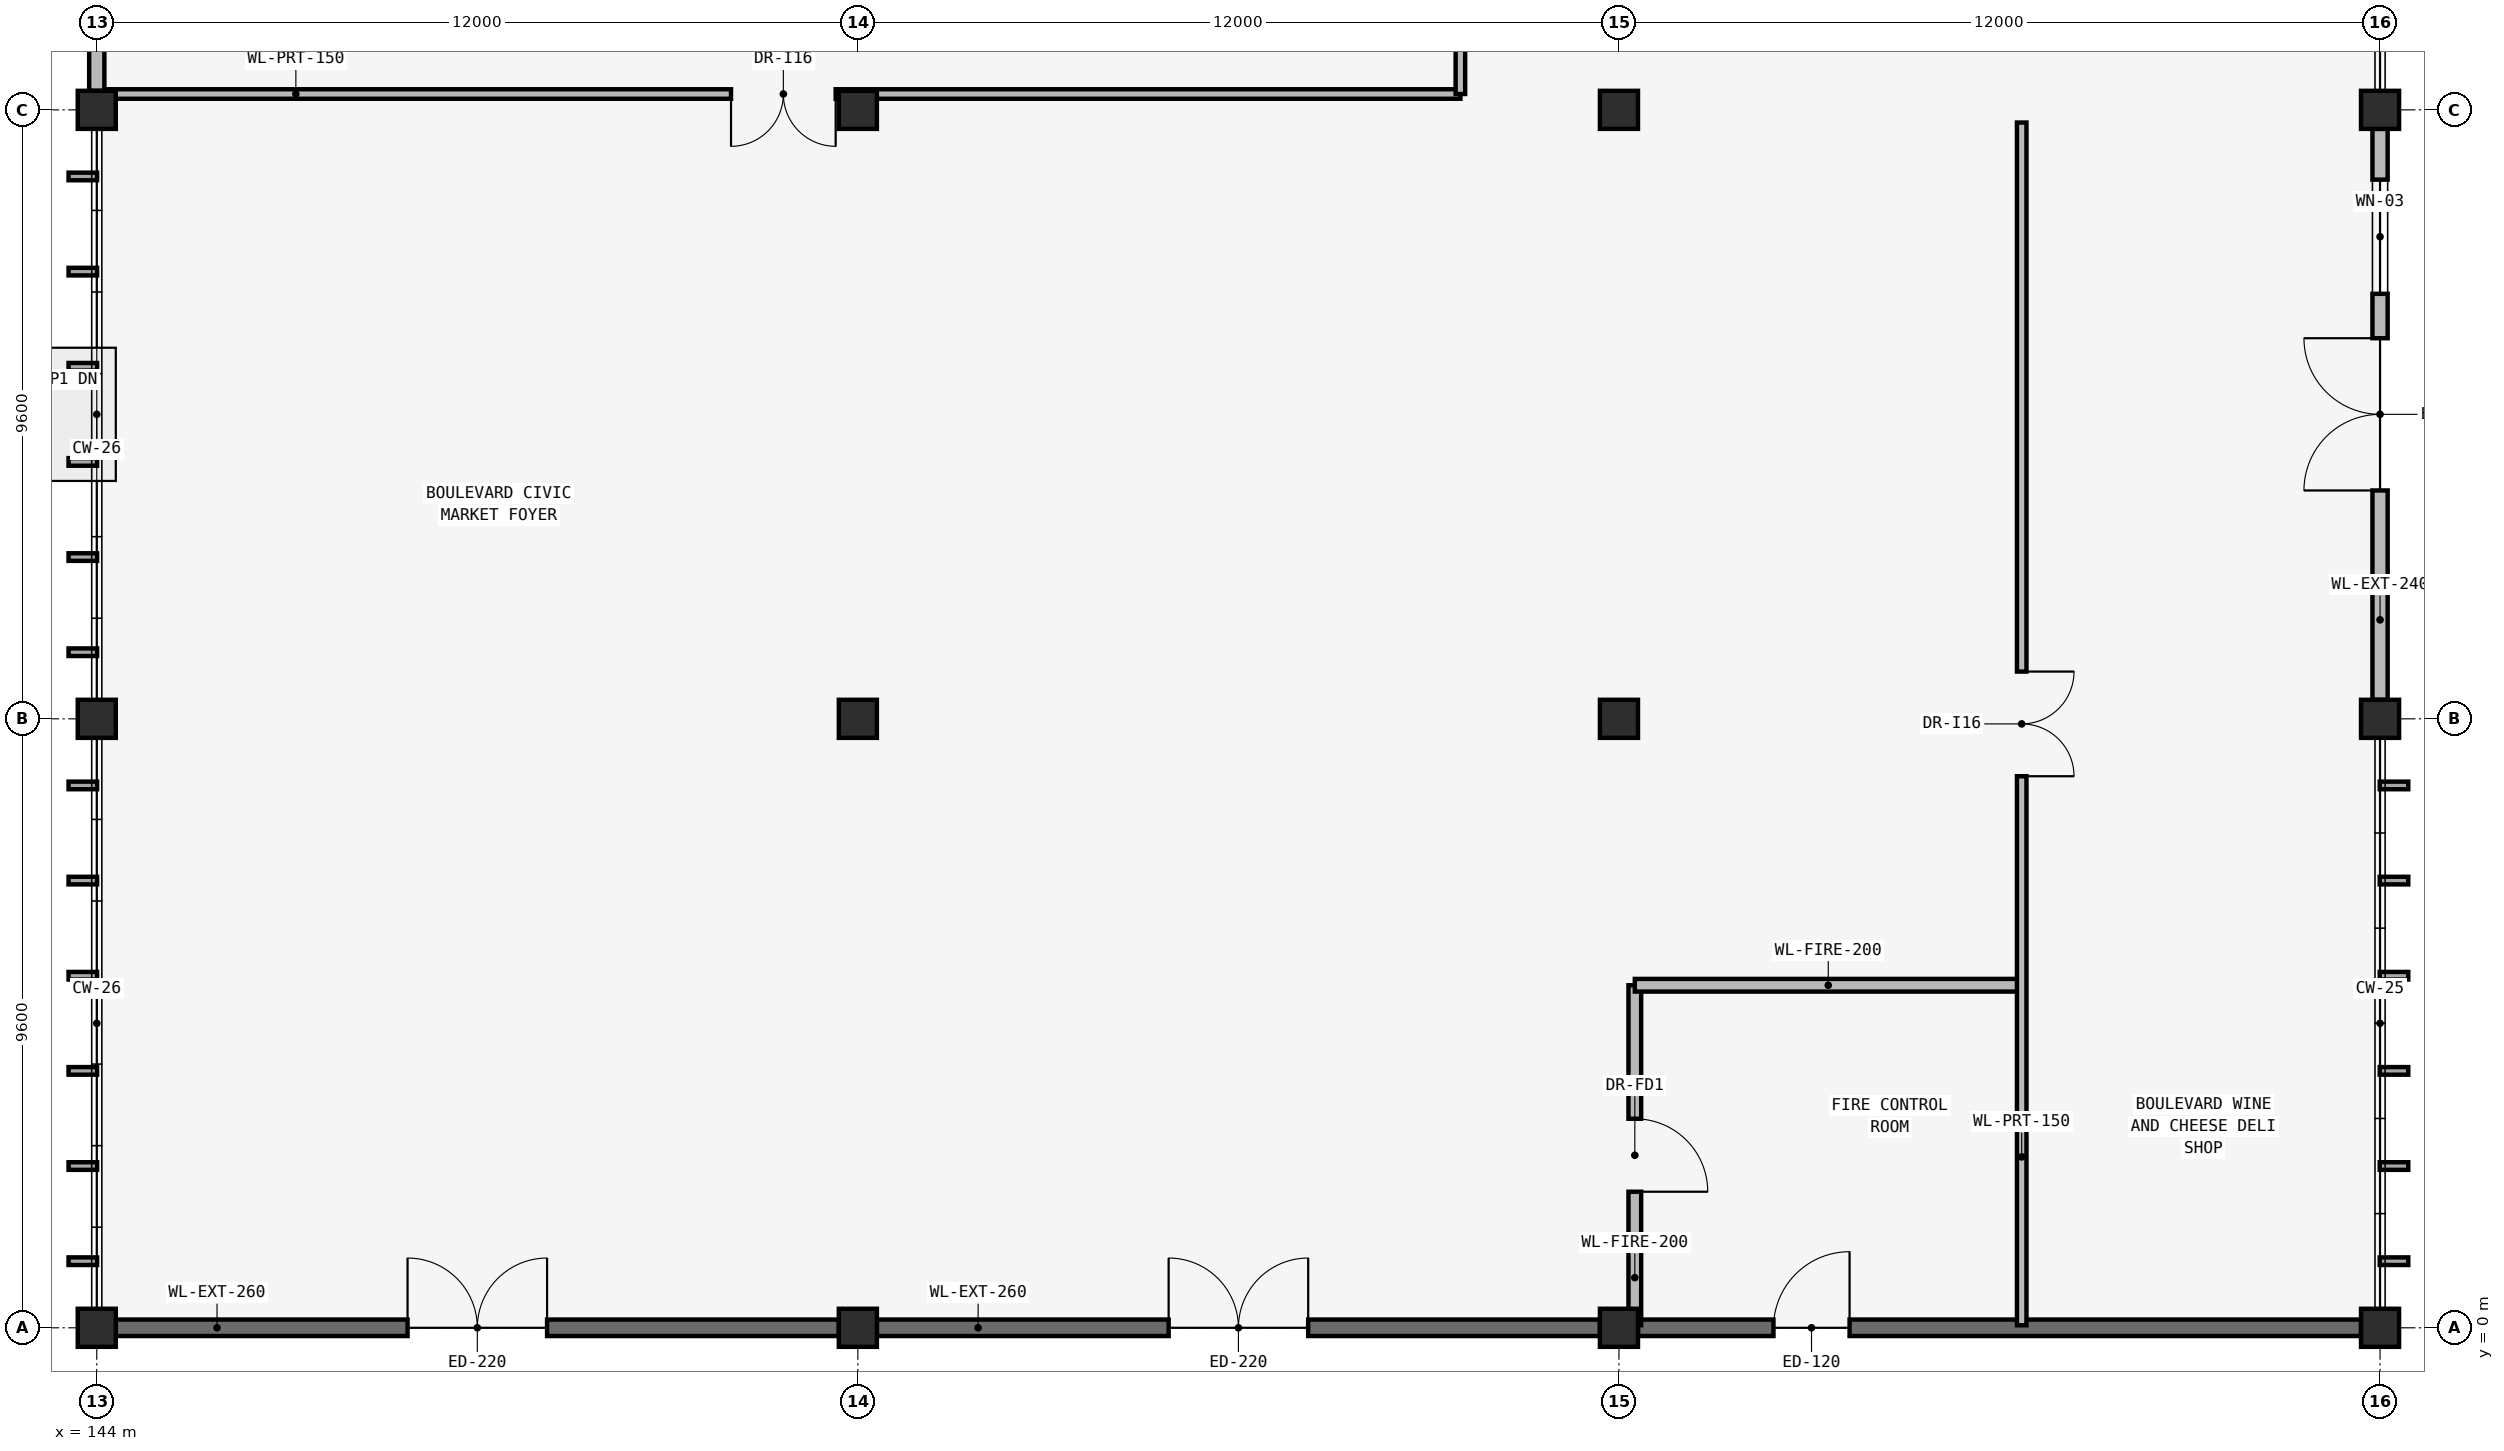
"""IFC4 building model, lengths in metres.
Left out: names, types, materials, properties, quantities, classifications, styles, units other than length and angle.
Written with IfcOpenShell. Run it as: python <this file> out.ifc"""

import sys

from ifc_helpers import new_model, si_unit, direction, frame, frame_2d, origin, origin_2d, place, context, subcontext, project, spatial, rectangle, extrude, element, fill, save


model = new_model("IFC4")
c1 = context("Model", 3, precision=1e-05, world=origin(), true_north=direction((0.0, 1.0)))
c2 = subcontext(c1, "Body", "Model", "MODEL_VIEW")
j1 = project(units=[si_unit("LENGTHUNIT", "METRE"), si_unit("PLANEANGLEUNIT", "RADIAN")], contexts=[c1])
p1 = place(None, origin())
s1 = spatial("IfcSite", under=j1, at=p1, CompositionType="ELEMENT")
p2 = place(p1, origin())
s2 = spatial("IfcBuilding", under=s1, at=p2, CompositionType="ELEMENT")
p3 = place(p2, origin())
s3 = spatial("IfcBuildingStorey", under=s2, at=p3, CompositionType="ELEMENT", Elevation=0.0)
for number, where, z_axis, x_axis in (
    (1, (144.0, 0.0, 0.0), (0.0, 0.0, 1.0), (1.0, 0.0, 0.0)),
    (2, (144.0, 9.6, 0.0), (0.0, 0.0, 1.0), (1.0, 0.0, 0.0)),
    (3, (144.0, 19.2, 0.0), (0.0, 0.0, 1.0), (1.0, 0.0, 0.0)),
    (4, (156.0, 0.0, 0.0), (0.0, 0.0, 1.0), (1.0, 0.0, 0.0)),
    (5, (156.0, 9.6, 0.0), (0.0, 0.0, 1.0), (1.0, 0.0, 0.0)),
    (6, (156.0, 19.2, 0.0), (0.0, 0.0, 1.0), (1.0, 0.0, 0.0)),
    (7, (168.0, 0.0, 0.0), (0.0, 0.0, 1.0), (1.0, 0.0, 0.0)),
    (8, (168.0, 9.6, 0.0), (0.0, 0.0, 1.0), (1.0, 0.0, 0.0)),
    (9, (168.0, 19.2, 0.0), (0.0, 0.0, 1.0), (1.0, 0.0, 0.0)),
    (10, (180.0, 0.0, 0.0), (0.0, 0.0, 1.0), (1.0, 0.0, 0.0)),
    (11, (180.0, 9.6, 0.0), (0.0, 0.0, 1.0), (1.0, 0.0, 0.0)),
    (12, (180.0, 19.2, 0.0), (0.0, 0.0, 1.0), (1.0, 0.0, 0.0)),
):
    element("IfcColumn", number, at=place(p3, frame(where, z_axis=z_axis, x_axis=x_axis)), inside=s3, PredefinedType="COLUMN", context=c2, shape_type="SweptSolid", body=[
        extrude(rectangle(XDim=0.6, YDim=0.6, at=origin_2d()), origin(), (0.0, 0.0, 1.0), 5.4),
    ])
p4 = place(p3, frame((144.3, 0.0, 0.0), z_axis=(0.0, 0.0, 1.0), x_axis=(1.0, 0.0, 0.0)))
e13 = element("IfcWall", 13, at=p4, inside=s3, PredefinedType="SOLIDWALL", context=c2, shape_type="SweptSolid", body=[
    extrude(rectangle(XDim=11.4, YDim=0.26, at=frame_2d((5.7, 0.0))), origin(), (0.0, 0.0, 1.0), 5.1),
])
p5 = place(p4, frame((4.6, 0.0, 0.0)))
e14 = element("IfcOpeningElement", 14, at=p5, cuts=e13, PredefinedType="OPENING", context=c2, shape_type="SweptSolid", body=[
    extrude(rectangle(XDim=2.2, YDim=2.4, at=frame_2d((1.1, 1.2))), frame((0.0, 0.145, 0.0), z_axis=(0.0, -1.0, 0.0), x_axis=(1.0, 0.0, 0.0)), (0.0, 0.0, 1.0), 0.29),
])
p6 = place(p3, frame((156.3, 0.0, 0.0), z_axis=(0.0, 0.0, 1.0), x_axis=(1.0, 0.0, 0.0)))
e15 = element("IfcWall", 15, at=p6, inside=s3, PredefinedType="SOLIDWALL", context=c2, shape_type="SweptSolid", body=[
    extrude(rectangle(XDim=11.4, YDim=0.26, at=frame_2d((5.7, 0.0))), origin(), (0.0, 0.0, 1.0), 5.1),
])
p7 = place(p6, frame((4.6, 0.0, 0.0)))
e16 = element("IfcOpeningElement", 16, at=p7, cuts=e15, PredefinedType="OPENING", context=c2, shape_type="SweptSolid", body=[
    extrude(rectangle(XDim=2.2, YDim=2.4, at=frame_2d((1.1, 1.2))), frame((0.0, 0.145, 0.0), z_axis=(0.0, -1.0, 0.0), x_axis=(1.0, 0.0, 0.0)), (0.0, 0.0, 1.0), 0.29),
])
p8 = place(p3, frame((168.3, 0.0, 0.0), z_axis=(0.0, 0.0, 1.0), x_axis=(1.0, 0.0, 0.0)))
e17 = element("IfcWall", 17, at=p8, inside=s3, PredefinedType="SOLIDWALL", context=c2, shape_type="SweptSolid", body=[
    extrude(rectangle(XDim=11.4, YDim=0.26, at=frame_2d((5.7, 0.0))), origin(), (0.0, 0.0, 1.0), 5.1),
])
p9 = place(p8, frame((2.136, 0.0, 0.0)))
e18 = element("IfcOpeningElement", 18, at=p9, cuts=e17, PredefinedType="OPENING", context=c2, shape_type="SweptSolid", body=[
    extrude(rectangle(XDim=1.2, YDim=2.2, at=frame_2d((0.6, 1.1))), frame((0.0, 0.145, 0.0), z_axis=(0.0, -1.0, 0.0), x_axis=(1.0, 0.0, 0.0)), (0.0, 0.0, 1.0), 0.29),
])
p10 = place(p3, frame((180.0, 9.9, 0.0), z_axis=(0.0, 0.0, 1.0), x_axis=(0.0, 1.0, 0.0)))
e19 = element("IfcWall", 19, at=p10, inside=s3, PredefinedType="SOLIDWALL", context=c2, shape_type="SweptSolid", body=[
    extrude(rectangle(XDim=9.0, YDim=0.24, at=frame_2d((4.5, 0.0))), origin(), (0.0, 0.0, 1.0), 4.321),
])
p11 = place(p10, frame((3.3, 0.0, 0.0)))
e20 = element("IfcOpeningElement", 20, at=p11, cuts=e19, PredefinedType="OPENING", context=c2, shape_type="SweptSolid", body=[
    extrude(rectangle(XDim=2.4, YDim=2.4, at=frame_2d((1.2, 1.2))), frame((0.0, 0.135, 0.0), z_axis=(0.0, -1.0, 0.0), x_axis=(1.0, 0.0, 0.0)), (0.0, 0.0, 1.0), 0.27),
])
p12 = place(p10, frame((6.4, 0.0, 0.9)))
e21 = element("IfcOpeningElement", 21, at=p12, cuts=e19, PredefinedType="OPENING", context=c2, shape_type="SweptSolid", body=[
    extrude(rectangle(XDim=1.8, YDim=1.8, at=frame_2d((0.9, 0.9))), frame((0.0, 0.135, 0.0), z_axis=(0.0, -1.0, 0.0), x_axis=(1.0, 0.0, 0.0)), (0.0, 0.0, 1.0), 0.27),
])
p13 = place(p3, frame((144.0, 19.5, 0.0), z_axis=(0.0, 0.0, 1.0), x_axis=(0.0, 1.0, 0.0)))
e22 = element("IfcWall", 22, at=p13, inside=s3, PredefinedType="SOLIDWALL", context=c2, shape_type="SweptSolid", body=[
    extrude(rectangle(XDim=9.0, YDim=0.24, at=frame_2d((4.5, 0.0))), origin(), (0.0, 0.0, 1.0), 4.321),
])
p14 = place(p13, frame((3.4, 0.0, 0.0)))
e23 = element("IfcOpeningElement", 23, at=p14, cuts=e22, PredefinedType="OPENING", context=c2, shape_type="SweptSolid", body=[
    extrude(rectangle(XDim=2.2, YDim=2.4, at=frame_2d((1.1, 1.2))), frame((0.0, 0.135, 0.0), z_axis=(0.0, -1.0, 0.0), x_axis=(1.0, 0.0, 0.0)), (0.0, 0.0, 1.0), 0.27),
])
p15 = place(p3, frame((168.25, 0.04, 0.0), z_axis=(0.0, 0.0, 1.0), x_axis=(0.0, 1.0, 0.0)))
e24 = element("IfcWall", 24, at=p15, inside=s3, PredefinedType="SOLIDWALL", context=c2, shape_type="SweptSolid", body=[
    extrude(rectangle(XDim=5.36, YDim=0.2, at=frame_2d((2.68, 0.0))), origin(), (0.0, 0.0, 1.0), 5.08),
])
p16 = place(p15, frame((2.105, 0.0, 0.0)))
e25 = element("IfcOpeningElement", 25, at=p16, cuts=e24, PredefinedType="OPENING", context=c2, shape_type="SweptSolid", body=[
    extrude(rectangle(XDim=1.15, YDim=2.15, at=frame_2d((0.575, 1.075))), frame((0.0, 0.115, 0.0), z_axis=(0.0, -1.0, 0.0), x_axis=(1.0, 0.0, 0.0)), (0.0, 0.0, 1.0), 0.23),
])
p17 = place(p3, frame((168.25, 5.4, 0.0), z_axis=(0.0, 0.0, 1.0), x_axis=(1.0, 0.0, 0.0)))
e26 = element("IfcWall", 26, at=p17, inside=s3, PredefinedType="SOLIDWALL", context=c2, shape_type="SweptSolid", body=[
    extrude(rectangle(XDim=6.1, YDim=0.2, at=frame_2d((3.05, 0.0))), origin(), (0.0, 0.0, 1.0), 5.08),
])
p18 = place(p3, frame((174.35, 0.04, 0.0), z_axis=(0.0, 0.0, 1.0), x_axis=(0.0, 1.0, 0.0)))
e27 = element("IfcWall", 27, at=p18, inside=s3, PredefinedType="PARTITIONING", context=c2, shape_type="SweptSolid", body=[
    extrude(rectangle(XDim=18.96, YDim=0.15, at=frame_2d((9.48, 0.0))), origin(), (0.0, 0.0, 1.0), 5.08),
])
p19 = place(p18, frame((8.655, 0.0, 0.0)))
e28 = element("IfcOpeningElement", 28, at=p19, cuts=e27, PredefinedType="OPENING", context=c2, shape_type="SweptSolid", body=[
    extrude(rectangle(XDim=1.65, YDim=2.2, at=frame_2d((0.825, 1.1))), frame((0.0, 0.09, 0.0), z_axis=(0.0, -1.0, 0.0), x_axis=(1.0, 0.0, 0.0)), (0.0, 0.0, 1.0), 0.18),
])
p20 = place(p3, frame((144.15, 19.45, 0.0), z_axis=(0.0, 0.0, 1.0), x_axis=(1.0, 0.0, 0.0)))
e29 = element("IfcWall", 29, at=p20, inside=s3, PredefinedType="PARTITIONING", context=c2, shape_type="SweptSolid", body=[
    extrude(rectangle(XDim=21.35, YDim=0.15, at=frame_2d((10.675, 0.0))), origin(), (0.0, 0.0, 1.0), 5.08),
])
p21 = place(p20, frame((9.85, 0.0, 0.0)))
e30 = element("IfcOpeningElement", 30, at=p21, cuts=e29, PredefinedType="OPENING", context=c2, shape_type="SweptSolid", body=[
    extrude(rectangle(XDim=1.65, YDim=2.2, at=frame_2d((0.825, 1.1))), frame((0.0, 0.09, 0.0), z_axis=(0.0, -1.0, 0.0), x_axis=(1.0, 0.0, 0.0)), (0.0, 0.0, 1.0), 0.18),
])
p22 = place(p3, frame((165.5, 19.45, 0.0), z_axis=(0.0, 0.0, 1.0), x_axis=(0.0, 1.0, 0.0)))
e31 = element("IfcWall", 31, at=p22, inside=s3, PredefinedType="PARTITIONING", context=c2, shape_type="SweptSolid", body=[
    extrude(rectangle(XDim=18.8, YDim=0.15, at=frame_2d((9.4, 0.0))), origin(), (0.0, 0.0, 1.0), 5.08),
])
p23 = place(p22, frame((8.475, 0.0, 0.0)))
e32 = element("IfcOpeningElement", 32, at=p23, cuts=e31, PredefinedType="OPENING", context=c2, shape_type="SweptSolid", body=[
    extrude(rectangle(XDim=1.85, YDim=2.2, at=frame_2d((0.925, 1.1))), frame((0.0, 0.09, 0.0), z_axis=(0.0, -1.0, 0.0), x_axis=(1.0, 0.0, 0.0)), (0.0, 0.0, 1.0), 0.18),
])
p24 = place(p5, frame((2.2, 0.0, 0.0), z_axis=(0.0, 0.0, 1.0), x_axis=(-1.0, 0.0, 0.0)))
e33 = element("IfcDoor", 33, at=p24, inside=s3, OperationType="DOUBLE_DOOR_SINGLE_SWING", PredefinedType="DOOR", context=c2, shape_type="SweptSolid", body=[
    extrude(rectangle(XDim=2.2, YDim=2.4, at=frame_2d((1.1, 1.2))), frame((0.0, 0.025, 0.0), z_axis=(0.0, -1.0, 0.0), x_axis=(1.0, 0.0, 0.0)), (0.0, 0.0, 1.0), 0.05),
])
fill(e14, e33)
p25 = place(p7, frame((2.2, 0.0, 0.0), z_axis=(0.0, 0.0, 1.0), x_axis=(-1.0, 0.0, 0.0)))
e34 = element("IfcDoor", 34, at=p25, inside=s3, OperationType="DOUBLE_DOOR_SINGLE_SWING", PredefinedType="DOOR", context=c2, shape_type="SweptSolid", body=[
    extrude(rectangle(XDim=2.2, YDim=2.4, at=frame_2d((1.1, 1.2))), frame((0.0, 0.025, 0.0), z_axis=(0.0, -1.0, 0.0), x_axis=(1.0, 0.0, 0.0)), (0.0, 0.0, 1.0), 0.05),
])
fill(e16, e34)
p26 = place(p9, frame((1.2, 0.0, 0.0), z_axis=(0.0, 0.0, 1.0), x_axis=(-1.0, 0.0, 0.0)))
e35 = element("IfcDoor", 35, at=p26, inside=s3, OperationType="SINGLE_SWING_RIGHT", PredefinedType="DOOR", context=c2, shape_type="SweptSolid", body=[
    extrude(rectangle(XDim=1.2, YDim=2.2, at=frame_2d((0.6, 1.1))), frame((0.0, 0.025, 0.0), z_axis=(0.0, -1.0, 0.0), x_axis=(1.0, 0.0, 0.0)), (0.0, 0.0, 1.0), 0.05),
])
fill(e18, e35)
p27 = place(p11, frame((2.4, 0.0, 0.0), z_axis=(0.0, 0.0, 1.0), x_axis=(-1.0, 0.0, 0.0)))
e36 = element("IfcDoor", 36, at=p27, inside=s3, OperationType="DOUBLE_DOOR_SINGLE_SWING", PredefinedType="DOOR", context=c2, shape_type="SweptSolid", body=[
    extrude(rectangle(XDim=2.4, YDim=2.4, at=frame_2d((1.2, 1.2))), frame((0.0, 0.025, 0.0), z_axis=(0.0, -1.0, 0.0), x_axis=(1.0, 0.0, 0.0)), (0.0, 0.0, 1.0), 0.05),
])
fill(e20, e36)
p28 = place(p12, origin())
e37 = element("IfcWindow", 37, at=p28, inside=s3, PartitioningType="SINGLE_PANEL", PredefinedType="WINDOW", context=c2, shape_type="SweptSolid", body=[
    extrude(rectangle(XDim=1.8, YDim=1.8, at=frame_2d((0.9, 0.9))), frame((0.0, 0.03, 0.0), z_axis=(0.0, -1.0, 0.0), x_axis=(1.0, 0.0, 0.0)), (0.0, 0.0, 1.0), 0.06),
])
fill(e21, e37)
p29 = place(p16, origin())
e38 = element("IfcDoor", 38, at=p29, inside=s3, OperationType="SINGLE_SWING_LEFT", PredefinedType="DOOR", context=c2, shape_type="SweptSolid", body=[
    extrude(rectangle(XDim=1.15, YDim=2.15, at=frame_2d((0.575, 1.075))), frame((0.0, 0.025, 0.0), z_axis=(0.0, -1.0, 0.0), x_axis=(1.0, 0.0, 0.0)), (0.0, 0.0, 1.0), 0.05),
])
fill(e25, e38)
p30 = place(p19, origin())
e39 = element("IfcDoor", 39, at=p30, inside=s3, OperationType="DOUBLE_DOOR_SINGLE_SWING", PredefinedType="DOOR", context=c2, shape_type="SweptSolid", body=[
    extrude(rectangle(XDim=1.65, YDim=2.2, at=frame_2d((0.825, 1.1))), frame((0.0, 0.025, 0.0), z_axis=(0.0, -1.0, 0.0), x_axis=(1.0, 0.0, 0.0)), (0.0, 0.0, 1.0), 0.05),
])
fill(e28, e39)
p31 = place(p21, origin())
e40 = element("IfcDoor", 40, at=p31, inside=s3, OperationType="DOUBLE_DOOR_SINGLE_SWING", PredefinedType="DOOR", context=c2, shape_type="SweptSolid", body=[
    extrude(rectangle(XDim=1.65, YDim=2.2, at=frame_2d((0.825, 1.1))), frame((0.0, 0.025, 0.0), z_axis=(0.0, -1.0, 0.0), x_axis=(1.0, 0.0, 0.0)), (0.0, 0.0, 1.0), 0.05),
])
fill(e30, e40)
save(model, sys.argv[1])
